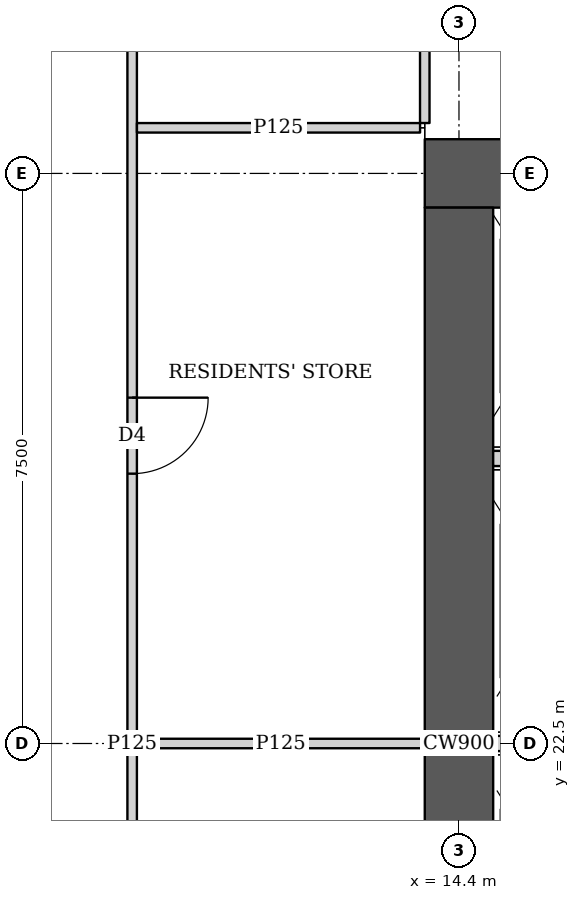
"""IFC4 building model, lengths in metres.
Left out: names, types, materials, properties, quantities, classifications, styles, units other than length and angle.
Written with IfcOpenShell. Run it as: python <this file> out.ifc"""

import sys

from ifc_helpers import new_model, si_unit, direction, frame, frame_2d, origin, place, context, subcontext, project, spatial, rectangle, extrude, element, fill, save


model = new_model("IFC4")
c1 = context("Model", 3, precision=1e-05, world=origin(), true_north=direction((0.0, 1.0)))
c2 = subcontext(c1, "Body", "Model", "MODEL_VIEW")
j1 = project(units=[si_unit("LENGTHUNIT", "METRE"), si_unit("PLANEANGLEUNIT", "RADIAN")], contexts=[c1])
p1 = place(None, origin())
s1 = spatial("IfcSite", under=j1, at=p1, CompositionType="ELEMENT")
p2 = place(p1, origin())
s2 = spatial("IfcBuilding", under=s1, at=p2, CompositionType="ELEMENT")
p3 = place(p2, frame((0.0, 0.0, 126.65)))
s3 = spatial("IfcBuildingStorey", under=s2, at=p3, CompositionType="ELEMENT", Elevation=126.65)
p4 = place(p3, frame((13.95, 30.0, 0.0), z_axis=(0.0, 0.0, 1.0), x_axis=(1.0, 0.0, 0.0)))
e1 = element("IfcWall", 1, at=p4, inside=s3, PredefinedType="SHEAR", context=c2, shape_type="SweptSolid", body=[
    extrude(rectangle(XDim=15.3, YDim=0.9, at=frame_2d((7.65, 0.0))), origin(), (0.0, 0.0, 1.0), 3.75),
])
p5 = place(p4, frame((4.45, 0.0, 0.0)))
e2 = element("IfcOpeningElement", 2, at=p5, cuts=e1, PredefinedType="OPENING", context=c2, shape_type="SweptSolid", body=[
    extrude(rectangle(XDim=1.8, YDim=2.1, at=frame_2d((0.9, 1.05))), frame((0.0, 0.46, 0.0), z_axis=(0.0, -1.0, 0.0), x_axis=(1.0, 0.0, 0.0)), (0.0, 0.0, 1.0), 0.92),
])
p6 = place(p4, frame((10.7, 0.0, 0.0)))
e3 = element("IfcOpeningElement", 3, at=p6, cuts=e1, PredefinedType="OPENING", context=c2, shape_type="SweptSolid", body=[
    extrude(rectangle(XDim=1.1, YDim=2.1, at=frame_2d((0.55, 1.05))), frame((0.0, 0.46, 0.0), z_axis=(0.0, -1.0, 0.0), x_axis=(1.0, 0.0, 0.0)), (0.0, 0.0, 1.0), 0.92),
])
p7 = place(p3, frame((14.4, 15.45, 0.0), z_axis=(0.0, 0.0, 1.0), x_axis=(0.0, 1.0, 0.0)))
e4 = element("IfcWall", 4, at=p7, inside=s3, PredefinedType="SHEAR", context=c2, shape_type="SweptSolid", body=[
    extrude(rectangle(XDim=14.1, YDim=0.9, at=frame_2d((7.05, 0.0))), origin(), (0.0, 0.0, 1.0), 3.75),
])
p8 = place(p3, frame((10.1, 10.05, 0.0), z_axis=(0.0, 0.0, 1.0), x_axis=(0.0, 1.0, 0.0)))
e5 = element("IfcWall", 5, at=p8, inside=s3, PredefinedType="PARTITIONING", context=c2, shape_type="SweptSolid", body=[
    extrude(rectangle(XDim=24.9, YDim=0.125, at=frame_2d((12.45, 0.0))), origin(), (0.0, 0.0, 1.0), 3.45),
])
p9 = place(p8, frame((1.675, 0.0, 0.0)))
e6 = element("IfcOpeningElement", 6, at=p9, cuts=e5, PredefinedType="OPENING", context=c2, shape_type="SweptSolid", body=[
    extrude(rectangle(XDim=1.0, YDim=2.1, at=frame_2d((0.5, 1.05))), frame((0.0, 0.073, 0.0), z_axis=(0.0, -1.0, 0.0), x_axis=(1.0, 0.0, 0.0)), (0.0, 0.0, 1.0), 0.145),
])
p10 = place(p8, frame((7.9, 0.0, 0.0)))
e7 = element("IfcOpeningElement", 7, at=p10, cuts=e5, PredefinedType="OPENING", context=c2, shape_type="SweptSolid", body=[
    extrude(rectangle(XDim=1.0, YDim=2.1, at=frame_2d((0.5, 1.05))), frame((0.0, 0.073, 0.0), z_axis=(0.0, -1.0, 0.0), x_axis=(1.0, 0.0, 0.0)), (0.0, 0.0, 1.0), 0.145),
])
p11 = place(p8, frame((16.0, 0.0, 0.0)))
e8 = element("IfcOpeningElement", 8, at=p11, cuts=e5, PredefinedType="OPENING", context=c2, shape_type="SweptSolid", body=[
    extrude(rectangle(XDim=1.0, YDim=2.1, at=frame_2d((0.5, 1.05))), frame((0.0, 0.073, 0.0), z_axis=(0.0, -1.0, 0.0), x_axis=(1.0, 0.0, 0.0)), (0.0, 0.0, 1.0), 0.145),
])
p12 = place(p8, frame((22.225, 0.0, 0.0)))
e9 = element("IfcOpeningElement", 9, at=p12, cuts=e5, PredefinedType="OPENING", context=c2, shape_type="SweptSolid", body=[
    extrude(rectangle(XDim=1.0, YDim=2.1, at=frame_2d((0.5, 1.05))), frame((0.0, 0.073, 0.0), z_axis=(0.0, -1.0, 0.0), x_axis=(1.0, 0.0, 0.0)), (0.0, 0.0, 1.0), 0.145),
])
p13 = place(p3, frame((10.163, 22.5, 0.0), z_axis=(0.0, 0.0, 1.0), x_axis=(1.0, 0.0, 0.0)))
e10 = element("IfcWall", 10, at=p13, inside=s3, PredefinedType="PARTITIONING", context=c2, shape_type="SweptSolid", body=[
    extrude(rectangle(XDim=3.787, YDim=0.125, at=frame_2d((1.894, 0.0))), origin(), (0.0, 0.0, 1.0), 3.45),
])
p14 = place(p3, frame((10.163, 30.6, 0.0), z_axis=(0.0, 0.0, 1.0), x_axis=(1.0, 0.0, 0.0)))
e11 = element("IfcWall", 11, at=p14, inside=s3, PredefinedType="PARTITIONING", context=c2, shape_type="SweptSolid", body=[
    extrude(rectangle(XDim=3.725, YDim=0.125, at=frame_2d((1.862, 0.0))), origin(), (0.0, 0.0, 1.0), 3.45),
])
p15 = place(p3, frame((13.95, 30.663, 0.0), z_axis=(0.0, 0.0, 1.0), x_axis=(0.0, 1.0, 0.0)))
e12 = element("IfcWall", 12, at=p15, inside=s3, PredefinedType="PARTITIONING", context=c2, shape_type="SweptSolid", body=[
    extrude(rectangle(XDim=4.174, YDim=0.125, at=frame_2d((2.087, 0.0))), origin(), (0.0, 0.0, 1.0), 3.45),
])
for number, where, z_axis, x_axis in (
    (13, (14.85, 22.5, 0.0), (0.0, 0.0, 1.0), (1.0, 0.0, 0.0)),
    (14, (14.85, 26.25, 0.0), (0.0, 0.0, 1.0), (1.0, 0.0, 0.0)),
):
    element("IfcWall", number, at=place(p3, frame(where, z_axis=z_axis, x_axis=x_axis)), inside=s3, PredefinedType="SOLIDWALL", context=c2, shape_type="SweptSolid", body=[
        extrude(rectangle(XDim=1.95, YDim=0.2, at=frame_2d((0.975, 0.0))), origin(), (0.0, 0.0, 1.0), 3.45),
    ])
p16 = place(p11, origin())
e15 = element("IfcDoor", 15, at=p16, inside=s3, OperationType="SINGLE_SWING_LEFT", PredefinedType="DOOR", context=c2, shape_type="SweptSolid", body=[
    extrude(rectangle(XDim=1.0, YDim=2.1, at=frame_2d((0.5, 1.05))), frame((0.0, 0.025, 0.0), z_axis=(0.0, -1.0, 0.0), x_axis=(1.0, 0.0, 0.0)), (0.0, 0.0, 1.0), 0.05),
])
fill(e8, e15)
save(model, sys.argv[1])
